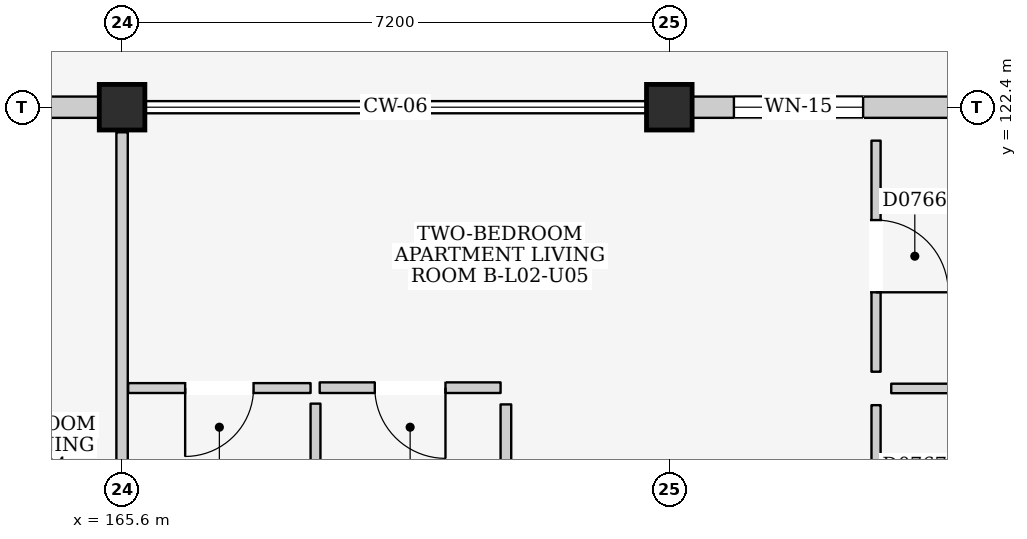
"""IFC4 building model, lengths in metres.
Left out: names, types, materials, properties, quantities, classifications, styles, units other than length and angle.
Written with IfcOpenShell. Run it as: python <this file> out.ifc"""

import sys

from ifc_helpers import new_model, si_unit, direction, frame, frame_2d, origin, origin_2d, place, context, subcontext, project, spatial, rectangle, extrude, element, fill, save


model = new_model("IFC4")
c1 = context("Model", 3, precision=1e-05, world=origin(), true_north=direction((0.0, 1.0)))
c2 = subcontext(c1, "Body", "Model", "MODEL_VIEW")
j1 = project(units=[si_unit("LENGTHUNIT", "METRE"), si_unit("PLANEANGLEUNIT", "RADIAN")], contexts=[c1])
p1 = place(None, origin())
s1 = spatial("IfcSite", under=j1, at=p1, CompositionType="ELEMENT")
p2 = place(p1, origin())
s2 = spatial("IfcBuilding", under=s1, at=p2, CompositionType="ELEMENT")
p3 = place(p2, frame((0.0, 0.0, 9.0)))
s3 = spatial("IfcBuildingStorey", under=s2, at=p3, CompositionType="ELEMENT", Elevation=9.0)
for number, where, z_axis, x_axis in (
    (1, (165.6, 122.4, 0.0), (0.0, 0.0, 1.0), (1.0, 0.0, 0.0)),
    (2, (172.8, 122.4, 0.0), (0.0, 0.0, 1.0), (1.0, 0.0, 0.0)),
):
    element("IfcColumn", number, at=place(p3, frame(where, z_axis=z_axis, x_axis=x_axis)), inside=s3, PredefinedType="COLUMN", context=c2, shape_type="SweptSolid", body=[
        extrude(rectangle(XDim=0.6, YDim=0.6, at=origin_2d()), origin(), (0.0, 0.0, 1.0), 3.2),
    ])
p4 = place(p3, frame((158.7, 122.4, 0.0), z_axis=(0.0, 0.0, 1.0), x_axis=(1.0, 0.0, 0.0)))
e3 = element("IfcWall", 3, at=p4, inside=s3, PredefinedType="ELEMENTEDWALL", context=c2, shape_type="SweptSolid", body=[
    extrude(rectangle(XDim=6.6, YDim=0.28, at=frame_2d((3.3, 0.0))), origin(), (0.0, 0.0, 1.0), 2.425),
])
p5 = place(p4, frame((3.85, 0.0, 0.0)))
e4 = element("IfcOpeningElement", 4, at=p5, cuts=e3, PredefinedType="OPENING", context=c2, shape_type="SweptSolid", body=[
    extrude(rectangle(XDim=1.6, YDim=2.12, at=frame_2d((0.8, 1.06))), frame((0.0, 0.155, 0.0), z_axis=(0.0, -1.0, 0.0), x_axis=(1.0, 0.0, 0.0)), (0.0, 0.0, 1.0), 0.31),
])
p6 = place(p4, frame((0.55, 0.0, 0.9)))
e5 = element("IfcOpeningElement", 5, at=p6, cuts=e3, PredefinedType="OPENING", context=c2, shape_type="SweptSolid", body=[
    extrude(rectangle(XDim=1.4, YDim=1.2, at=frame_2d((0.7, 0.6))), frame((0.0, 0.155, 0.0), z_axis=(0.0, -1.0, 0.0), x_axis=(1.0, 0.0, 0.0)), (0.0, 0.0, 1.0), 0.31),
])
p7 = place(p3, frame((173.1, 122.4, 0.0), z_axis=(0.0, 0.0, 1.0), x_axis=(1.0, 0.0, 0.0)))
e6 = element("IfcWall", 6, at=p7, inside=s3, PredefinedType="ELEMENTEDWALL", context=c2, shape_type="SweptSolid", body=[
    extrude(rectangle(XDim=6.6, YDim=0.28, at=frame_2d((3.3, 0.0))), origin(), (0.0, 0.0, 1.0), 2.425),
])
p8 = place(p7, frame((3.85, 0.0, 0.0)))
e7 = element("IfcOpeningElement", 7, at=p8, cuts=e6, PredefinedType="OPENING", context=c2, shape_type="SweptSolid", body=[
    extrude(rectangle(XDim=2.4, YDim=2.12, at=frame_2d((1.2, 1.06))), frame((0.0, 0.155, 0.0), z_axis=(0.0, -1.0, 0.0), x_axis=(1.0, 0.0, 0.0)), (0.0, 0.0, 1.0), 0.31),
])
p9 = place(p7, frame((0.55, 0.0, 0.865)))
e8 = element("IfcOpeningElement", 8, at=p9, cuts=e6, PredefinedType="OPENING", context=c2, shape_type="SweptSolid", body=[
    extrude(rectangle(XDim=1.7, YDim=1.45, at=frame_2d((0.85, 0.725))), frame((0.0, 0.155, 0.0), z_axis=(0.0, -1.0, 0.0), x_axis=(1.0, 0.0, 0.0)), (0.0, 0.0, 1.0), 0.31),
])
p10 = place(p3, frame((165.6, 115.53, 0.0), z_axis=(0.0, 0.0, 1.0), x_axis=(0.0, 1.0, 0.0)))
e9 = element("IfcWall", 9, at=p10, inside=s3, PredefinedType="PARTITIONING", context=c2, shape_type="SweptSolid", body=[
    extrude(rectangle(XDim=6.54, YDim=0.15, at=frame_2d((3.27, 0.0))), origin(), (0.0, 0.0, 1.0), 2.395),
])
p11 = place(p3, frame((165.68, 118.705, 0.0), z_axis=(0.0, 0.0, 1.0), x_axis=(1.0, 0.0, 0.0)))
e10 = element("IfcWall", 10, at=p11, inside=s3, PredefinedType="PARTITIONING", context=c2, shape_type="SweptSolid", body=[
    extrude(rectangle(XDim=2.4, YDim=0.13, at=frame_2d((1.2, 0.0))), origin(), (0.0, 0.0, 1.0), 2.96),
])
p12 = place(p11, frame((0.75, 0.0, 0.0)))
e11 = element("IfcOpeningElement", 11, at=p12, cuts=e10, PredefinedType="OPENING", context=c2, shape_type="SweptSolid", body=[
    extrude(rectangle(XDim=0.9, YDim=2.1, at=frame_2d((0.45, 1.05))), frame((0.0, 0.08, 0.0), z_axis=(0.0, -1.0, 0.0), x_axis=(1.0, 0.0, 0.0)), (0.0, 0.0, 1.0), 0.16),
])
p13 = place(p3, frame((168.145, 115.46, 0.0), z_axis=(0.0, 0.0, 1.0), x_axis=(0.0, 1.0, 0.0)))
e12 = element("IfcWall", 12, at=p13, inside=s3, PredefinedType="PARTITIONING", context=c2, shape_type="SweptSolid", body=[
    extrude(rectangle(XDim=3.04, YDim=0.13, at=frame_2d((1.52, 0.0))), origin(), (0.0, 0.0, 1.0), 2.96),
])
p14 = place(p3, frame((168.2, 118.71, 0.0), z_axis=(0.0, 0.0, 1.0), x_axis=(1.0, 0.0, 0.0)))
e13 = element("IfcWall", 13, at=p14, inside=s3, PredefinedType="PARTITIONING", context=c2, shape_type="SweptSolid", body=[
    extrude(rectangle(XDim=2.38, YDim=0.14, at=frame_2d((1.19, 0.0))), origin(), (0.0, 0.0, 1.0), 2.96),
])
p15 = place(p14, frame((0.725, 0.0, 0.0)))
e14 = element("IfcOpeningElement", 14, at=p15, cuts=e13, PredefinedType="OPENING", context=c2, shape_type="SweptSolid", body=[
    extrude(rectangle(XDim=0.93, YDim=2.14, at=frame_2d((0.465, 1.07))), frame((0.0, 0.085, 0.0), z_axis=(0.0, -1.0, 0.0), x_axis=(1.0, 0.0, 0.0)), (0.0, 0.0, 1.0), 0.17),
])
p16 = place(p3, frame((170.65, 115.43, 0.0), z_axis=(0.0, 0.0, 1.0), x_axis=(0.0, 1.0, 0.0)))
e15 = element("IfcWall", 15, at=p16, inside=s3, PredefinedType="PARTITIONING", context=c2, shape_type="SweptSolid", body=[
    extrude(rectangle(XDim=3.06, YDim=0.14, at=frame_2d((1.53, 0.0))), origin(), (0.0, 0.0, 1.0), 2.96),
])
p17 = place(p3, frame((175.52, 118.92, 0.0), z_axis=(0.0, 0.0, 1.0), x_axis=(0.0, 1.0, 0.0)))
e16 = element("IfcWall", 16, at=p17, inside=s3, PredefinedType="PARTITIONING", context=c2, shape_type="SweptSolid", body=[
    extrude(rectangle(XDim=3.04, YDim=0.12, at=frame_2d((1.52, 0.0))), origin(), (0.0, 0.0, 1.0), 2.96),
])
p18 = place(p17, frame((1.045, 0.0, 0.0)))
e17 = element("IfcOpeningElement", 17, at=p18, cuts=e16, PredefinedType="OPENING", context=c2, shape_type="SweptSolid", body=[
    extrude(rectangle(XDim=0.95, YDim=2.15, at=frame_2d((0.475, 1.075))), frame((0.0, 0.075, 0.0), z_axis=(0.0, -1.0, 0.0), x_axis=(1.0, 0.0, 0.0)), (0.0, 0.0, 1.0), 0.15),
])
p19 = place(p3, frame((175.72, 118.7, 0.0), z_axis=(0.0, 0.0, 1.0), x_axis=(1.0, 0.0, 0.0)))
e18 = element("IfcWall", 18, at=p19, inside=s3, PredefinedType="PARTITIONING", context=c2, shape_type="SweptSolid", body=[
    extrude(rectangle(XDim=4.06, YDim=0.125, at=frame_2d((2.03, 0.0))), origin(), (0.0, 0.0, 1.0), 2.96),
])
p20 = place(p3, frame((175.52, 115.44, 0.0), z_axis=(0.0, 0.0, 1.0), x_axis=(0.0, 1.0, 0.0)))
e19 = element("IfcWall", 19, at=p20, inside=s3, PredefinedType="PARTITIONING", context=c2, shape_type="SweptSolid", body=[
    extrude(rectangle(XDim=3.04, YDim=0.12, at=frame_2d((1.52, 0.0))), origin(), (0.0, 0.0, 1.0), 2.96),
])
p21 = place(p20, frame((1.04, 0.0, 0.0)))
e20 = element("IfcOpeningElement", 20, at=p21, cuts=e19, PredefinedType="OPENING", context=c2, shape_type="SweptSolid", body=[
    extrude(rectangle(XDim=0.96, YDim=2.15, at=frame_2d((0.48, 1.075))), frame((0.0, 0.075, 0.0), z_axis=(0.0, -1.0, 0.0), x_axis=(1.0, 0.0, 0.0)), (0.0, 0.0, 1.0), 0.15),
])
p22 = place(p9, origin())
e21 = element("IfcWindow", 21, at=p22, inside=s3, PartitioningType="DOUBLE_PANEL_VERTICAL", PredefinedType="WINDOW", context=c2, shape_type="SweptSolid", body=[
    extrude(rectangle(XDim=1.7, YDim=1.45, at=frame_2d((0.85, 0.725))), frame((0.0, 0.03, 0.0), z_axis=(0.0, -1.0, 0.0), x_axis=(1.0, 0.0, 0.0)), (0.0, 0.0, 1.0), 0.06),
])
fill(e8, e21)
p23 = place(p12, frame((0.9, 0.0, 0.0), z_axis=(0.0, 0.0, 1.0), x_axis=(-1.0, 0.0, 0.0)))
e22 = element("IfcDoor", 22, at=p23, inside=s3, OperationType="SINGLE_SWING_RIGHT", PredefinedType="DOOR", context=c2, shape_type="SweptSolid", body=[
    extrude(rectangle(XDim=0.9, YDim=2.1, at=frame_2d((0.45, 1.05))), frame((0.0, 0.025, 0.0), z_axis=(0.0, -1.0, 0.0), x_axis=(1.0, 0.0, 0.0)), (0.0, 0.0, 1.0), 0.05),
])
fill(e11, e22)
p24 = place(p15, frame((0.93, 0.0, 0.0), z_axis=(0.0, 0.0, 1.0), x_axis=(-1.0, 0.0, 0.0)))
e23 = element("IfcDoor", 23, at=p24, inside=s3, OperationType="SINGLE_SWING_LEFT", PredefinedType="DOOR", context=c2, shape_type="SweptSolid", body=[
    extrude(rectangle(XDim=0.93, YDim=2.14, at=frame_2d((0.465, 1.07))), frame((0.0, 0.025, 0.0), z_axis=(0.0, -1.0, 0.0), x_axis=(1.0, 0.0, 0.0)), (0.0, 0.0, 1.0), 0.05),
])
fill(e14, e23)
p25 = place(p18, frame((0.95, 0.0, 0.0), z_axis=(0.0, 0.0, 1.0), x_axis=(-1.0, 0.0, 0.0)))
e24 = element("IfcDoor", 24, at=p25, inside=s3, OperationType="SINGLE_SWING_RIGHT", PredefinedType="DOOR", context=c2, shape_type="SweptSolid", body=[
    extrude(rectangle(XDim=0.95, YDim=2.15, at=frame_2d((0.475, 1.075))), frame((0.0, 0.025, 0.0), z_axis=(0.0, -1.0, 0.0), x_axis=(1.0, 0.0, 0.0)), (0.0, 0.0, 1.0), 0.05),
])
fill(e17, e24)
save(model, sys.argv[1])
